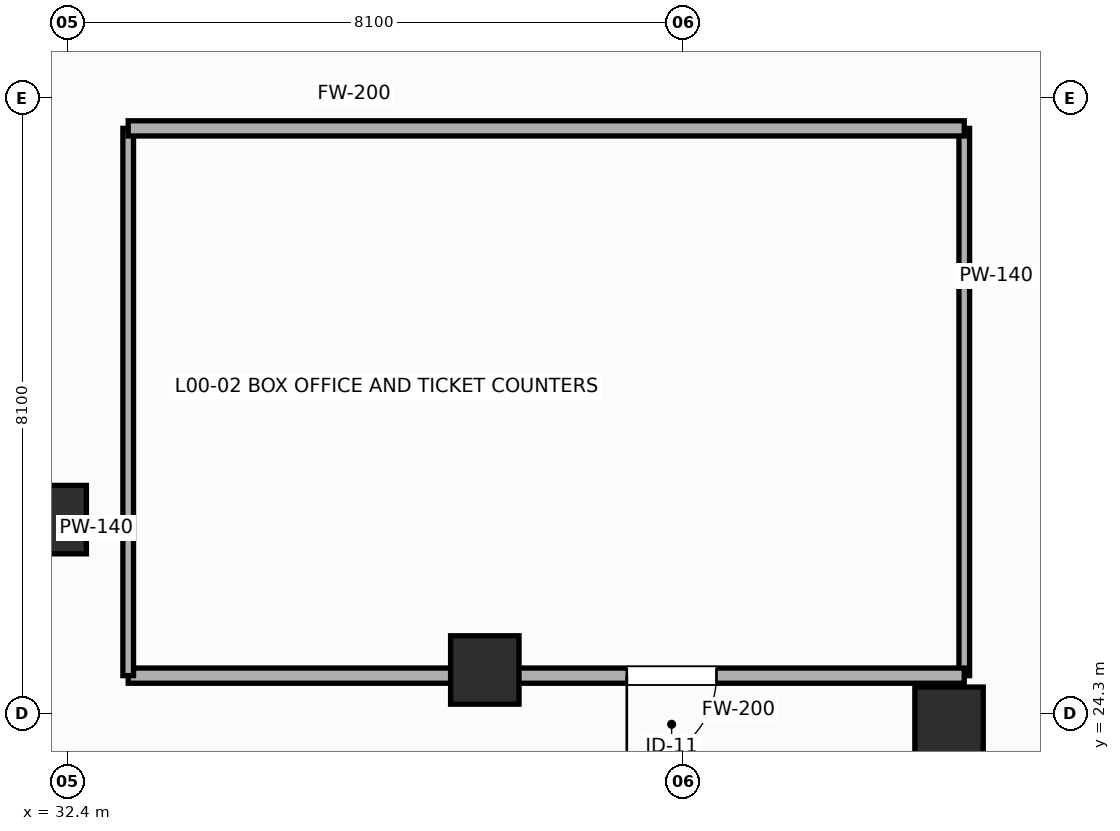
"""IFC4 building model, lengths in metres.
Left out: names, types, materials, properties, quantities, classifications, styles, units other than length and angle.
Written with IfcOpenShell. Run it as: python <this file> out.ifc"""

import sys

from ifc_helpers import new_model, si_unit, direction, frame, frame_2d, origin, origin_2d, place, context, subcontext, project, spatial, rectangle, extrude, element, fill, save


model = new_model("IFC4")
c1 = context("Model", 3, precision=1e-05, world=origin(), true_north=direction((0.0, 1.0)))
c2 = subcontext(c1, "Body", "Model", "MODEL_VIEW")
j1 = project(units=[si_unit("LENGTHUNIT", "METRE"), si_unit("PLANEANGLEUNIT", "RADIAN")], contexts=[c1])
p1 = place(None, origin())
s1 = spatial("IfcSite", under=j1, at=p1, CompositionType="ELEMENT")
p2 = place(p1, origin())
s2 = spatial("IfcBuilding", under=s1, at=p2, CompositionType="ELEMENT")
p3 = place(p2, origin())
s3 = spatial("IfcBuildingStorey", under=s2, at=p3, CompositionType="ELEMENT", Elevation=0.0)
for number, where, z_axis, x_axis in (
    (1, (32.2, 26.853, 0.0), (0.0, 0.0, 1.0), (1.0, 0.0, 0.0)),
    (2, (37.892, 24.875, 0.0), (0.0, 0.0, 1.0), (1.0, 0.0, 0.0)),
    (3, (44.0, 24.2, 0.0), (0.0, 0.0, 1.0), (1.0, 0.0, 0.0)),
):
    element("IfcColumn", number, at=place(p3, frame(where, z_axis=z_axis, x_axis=x_axis)), inside=s3, PredefinedType="COLUMN", context=c2, shape_type="SweptSolid", body=[
        extrude(rectangle(XDim=0.9, YDim=0.9, at=origin_2d()), origin(), (0.0, 0.0, 1.0), 5.4),
    ])
p4 = place(p3, frame((35.901, 21.563, 0.0), z_axis=(0.0, 0.0, 1.0), x_axis=(-0.949910284605, 0.312522721096, 0.0)))
e4 = element("IfcWall", 4, at=p4, inside=s3, PredefinedType="SOLIDWALL", context=c2, shape_type="SweptSolid", body=[
    extrude(rectangle(XDim=6.765, YDim=0.38, at=frame_2d((3.383, 0.0))), origin(), (0.0, 0.0, 1.0), 5.08),
])
p5 = place(p4, frame((2.203, 0.0, 0.0)))
e5 = element("IfcOpeningElement", 5, at=p5, cuts=e4, PredefinedType="OPENING", context=c2, shape_type="SweptSolid", body=[
    extrude(rectangle(XDim=2.36, YDim=2.4, at=frame_2d((1.18, 1.2))), frame((0.0, 0.2, 0.0), z_axis=(0.0, -1.0, 0.0), x_axis=(1.0, 0.0, 0.0)), (0.0, 0.0, 1.0), 0.4),
])
p6 = place(p3, frame((44.2, 32.0, 0.0), z_axis=(0.0, 0.0, 1.0), x_axis=(0.0, -1.0, 0.0)))
e6 = element("IfcWall", 6, at=p6, inside=s3, PredefinedType="PARTITIONING", context=c2, shape_type="SweptSolid", body=[
    extrude(rectangle(XDim=7.2, YDim=0.14, at=frame_2d((3.6, 0.0))), origin(), (0.0, 0.0, 1.0), 5.12),
])
p7 = place(p3, frame((44.2, 24.8, 0.0), z_axis=(0.0, 0.0, 1.0), x_axis=(-1.0, 0.0, 0.0)))
e7 = element("IfcWall", 7, at=p7, inside=s3, PredefinedType="PARTITIONING", context=c2, shape_type="SweptSolid", body=[
    extrude(rectangle(XDim=11.0, YDim=0.2, at=frame_2d((5.5, 0.0))), origin(), (0.0, 0.0, 1.0), 4.224),
])
p8 = place(p7, frame((3.26, 0.0, 0.0)))
e8 = element("IfcOpeningElement", 8, at=p8, cuts=e7, PredefinedType="OPENING", context=c2, shape_type="SweptSolid", body=[
    extrude(rectangle(XDim=1.18, YDim=2.22, at=frame_2d((0.59, 1.11))), frame((0.0, 0.11, 0.0), z_axis=(0.0, -1.0, 0.0), x_axis=(1.0, 0.0, 0.0)), (0.0, 0.0, 1.0), 0.22),
])
p9 = place(p3, frame((33.2, 24.8, 0.0), z_axis=(0.0, 0.0, 1.0), x_axis=(0.0, 1.0, 0.0)))
e9 = element("IfcWall", 9, at=p9, inside=s3, PredefinedType="PARTITIONING", context=c2, shape_type="SweptSolid", body=[
    extrude(rectangle(XDim=7.2, YDim=0.14, at=frame_2d((3.6, 0.0))), origin(), (0.0, 0.0, 1.0), 5.12),
])
p10 = place(p3, frame((33.2, 32.0, 0.0), z_axis=(0.0, 0.0, 1.0), x_axis=(1.0, 0.0, 0.0)))
e10 = element("IfcWall", 10, at=p10, inside=s3, PredefinedType="PARTITIONING", context=c2, shape_type="SweptSolid", body=[
    extrude(rectangle(XDim=11.0, YDim=0.2, at=frame_2d((5.5, 0.0))), origin(), (0.0, 0.0, 1.0), 5.12),
])
p11 = place(p8, origin())
e11 = element("IfcDoor", 11, at=p11, inside=s3, OperationType="SINGLE_SWING_RIGHT", PredefinedType="DOOR", context=c2, shape_type="SweptSolid", body=[
    extrude(rectangle(XDim=1.18, YDim=2.22, at=frame_2d((0.59, 1.11))), frame((0.0, 0.025, 0.0), z_axis=(0.0, -1.0, 0.0), x_axis=(1.0, 0.0, 0.0)), (0.0, 0.0, 1.0), 0.05),
])
fill(e8, e11)
save(model, sys.argv[1])
